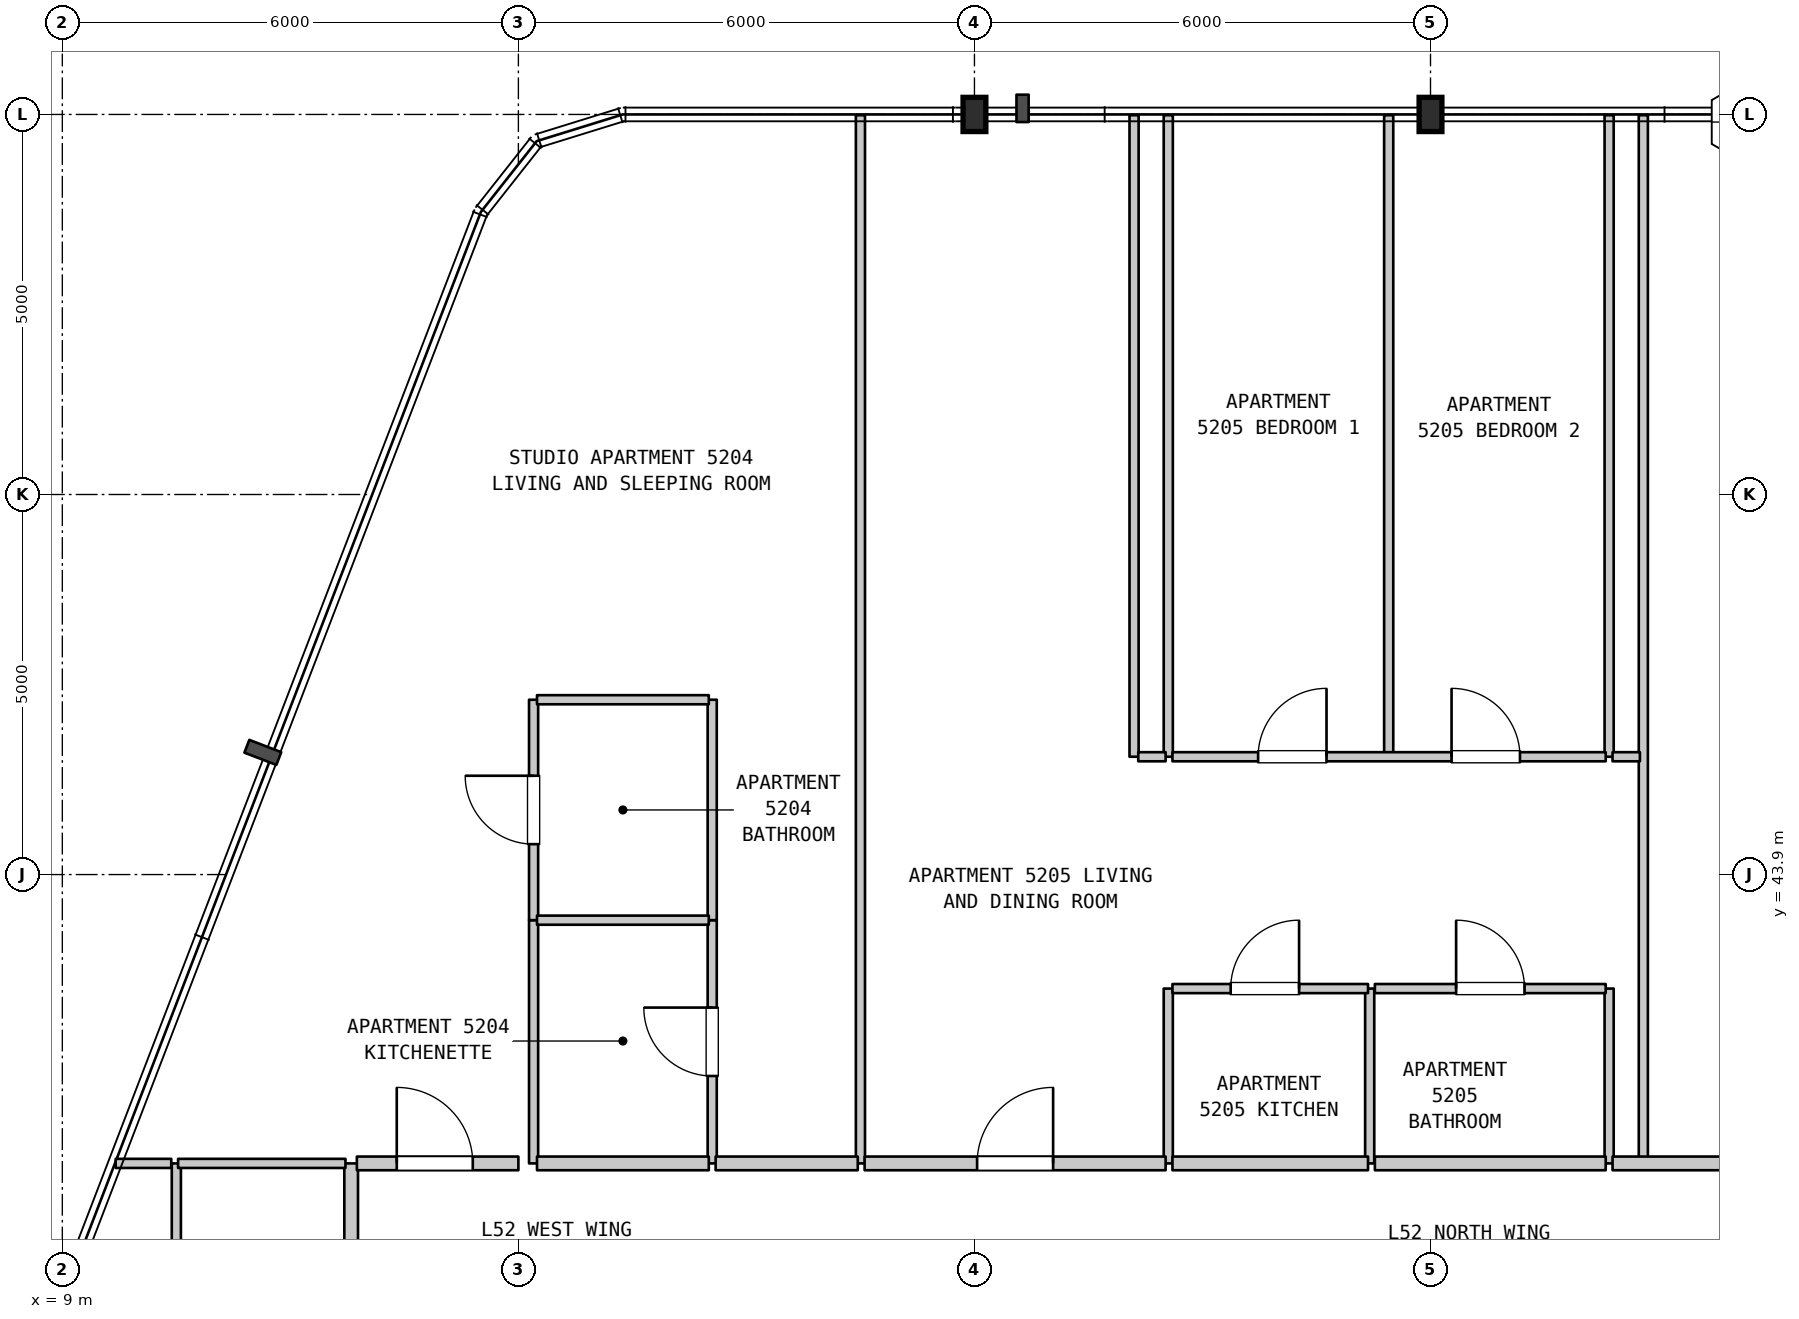
"""IFC4 building model, lengths in metres.
Left out: names, types, materials, properties, quantities, classifications, styles, units other than length and angle.
Written with IfcOpenShell. Run it as: python <this file> out.ifc"""

import sys

from ifc_helpers import new_model, si_unit, direction, frame, frame_2d, origin, origin_2d, place, context, subcontext, project, spatial, rectangle, i_section, extrude, element, fill, save


model = new_model("IFC4")
c1 = context("Model", 3, precision=1e-05, world=origin(), true_north=direction((0.0, 1.0)))
c2 = subcontext(c1, "Body", "Model", "MODEL_VIEW")
j1 = project(units=[si_unit("LENGTHUNIT", "METRE"), si_unit("PLANEANGLEUNIT", "RADIAN")], contexts=[c1])
p1 = place(None, origin())
s1 = spatial("IfcSite", under=j1, at=p1, CompositionType="ELEMENT")
p2 = place(p1, origin())
s2 = spatial("IfcBuilding", under=s1, at=p2, CompositionType="ELEMENT")
p3 = place(p2, frame((0.0, 0.0, 210.6)))
s3 = spatial("IfcBuildingStorey", under=s2, at=p3, CompositionType="ELEMENT", Elevation=210.6)
for number, where, z_axis, x_axis in (
    (1, (21.0, 53.9, 0.0), (0.0, 0.0, 1.0), (1.0, 0.0, 0.0)),
    (2, (27.0, 53.9, 0.0), (0.0, 0.0, 1.0), (1.0, 0.0, 0.0)),
):
    element("IfcColumn", number, at=place(p3, frame(where, z_axis=z_axis, x_axis=x_axis)), inside=s3, PredefinedType="COLUMN", context=c2, shape_type="SweptSolid", body=[
        extrude(i_section(OverallWidth=0.3, OverallDepth=0.45, WebThickness=0.014, FlangeThickness=0.026, FilletRadius=0.027, at=origin_2d()), origin(), (0.0, 0.0, 1.0), 3.7),
    ])
p4 = place(p3, frame((10.5, 31.45, 0.0), z_axis=(0.0, 0.0, 1.0), x_axis=(0.0, 1.0, 0.0)))
e3 = element("IfcWall", 3, at=p4, inside=s3, PredefinedType="PARTITIONING", context=c2, shape_type="SweptSolid", body=[
    extrude(rectangle(XDim=8.65, YDim=0.12, at=frame_2d((4.325, 0.0))), origin(), (0.0, 0.0, 1.0), 3.39),
])
p5 = place(p3, frame((12.8, 31.45, 0.0), z_axis=(0.0, 0.0, 1.0), x_axis=(0.0, 1.0, 0.0)))
e4 = element("IfcWall", 4, at=p5, inside=s3, PredefinedType="STANDARD", context=c2, shape_type="SweptSolid", body=[
    extrude(rectangle(XDim=8.65, YDim=0.18, at=frame_2d((4.325, 0.0))), origin(), (0.0, 0.0, 1.0), 3.39),
])
p6 = place(p3, frame((15.2, 40.1, 0.0), z_axis=(0.0, 0.0, 1.0), x_axis=(0.0, 1.0, 0.0)))
e5 = element("IfcWall", 5, at=p6, inside=s3, PredefinedType="PARTITIONING", context=c2, shape_type="SweptSolid", body=[
    extrude(rectangle(XDim=3.2, YDim=0.12, at=frame_2d((1.6, 0.0))), origin(), (0.0, 0.0, 1.0), 3.39),
])
p7 = place(p3, frame((15.2, 43.3, 0.0), z_axis=(0.0, 0.0, 1.0), x_axis=(0.0, 1.0, 0.0)))
e6 = element("IfcWall", 6, at=p7, inside=s3, PredefinedType="PARTITIONING", context=c2, shape_type="SweptSolid", body=[
    extrude(rectangle(XDim=2.9, YDim=0.12, at=frame_2d((1.45, 0.0))), origin(), (0.0, 0.0, 1.0), 3.39),
])
p8 = place(p7, frame((1.0, 0.0, 0.0)))
e7 = element("IfcOpeningElement", 7, at=p8, cuts=e6, PredefinedType="OPENING", context=c2, shape_type="SweptSolid", body=[
    extrude(rectangle(XDim=0.9, YDim=2.1, at=frame_2d((0.45, 1.05))), frame((0.0, 0.07, 0.0), z_axis=(0.0, -1.0, 0.0), x_axis=(1.0, 0.0, 0.0)), (0.0, 0.0, 1.0), 0.14),
])
p9 = place(p3, frame((17.55, 40.1, 0.0), z_axis=(0.0, 0.0, 1.0), x_axis=(0.0, 1.0, 0.0)))
e8 = element("IfcWall", 8, at=p9, inside=s3, PredefinedType="PARTITIONING", context=c2, shape_type="SweptSolid", body=[
    extrude(rectangle(XDim=3.2, YDim=0.12, at=frame_2d((1.6, 0.0))), origin(), (0.0, 0.0, 1.0), 3.39),
])
p10 = place(p9, frame((1.15, 0.0, 0.0)))
e9 = element("IfcOpeningElement", 9, at=p10, cuts=e8, PredefinedType="OPENING", context=c2, shape_type="SweptSolid", body=[
    extrude(rectangle(XDim=0.9, YDim=2.15, at=frame_2d((0.45, 1.075))), frame((0.0, 0.07, 0.0), z_axis=(0.0, -1.0, 0.0), x_axis=(1.0, 0.0, 0.0)), (0.0, 0.0, 1.0), 0.14),
])
p11 = place(p3, frame((17.55, 43.3, 0.0), z_axis=(0.0, 0.0, 1.0), x_axis=(0.0, 1.0, 0.0)))
e10 = element("IfcWall", 10, at=p11, inside=s3, PredefinedType="PARTITIONING", context=c2, shape_type="SweptSolid", body=[
    extrude(rectangle(XDim=2.9, YDim=0.12, at=frame_2d((1.45, 0.0))), origin(), (0.0, 0.0, 1.0), 3.39),
])
p12 = place(p3, frame((19.5, 40.1, 0.0), z_axis=(0.0, 0.0, 1.0), x_axis=(0.0, 1.0, 0.0)))
e11 = element("IfcWall", 11, at=p12, inside=s3, PredefinedType="PARTITIONING", context=c2, shape_type="SweptSolid", body=[
    extrude(rectangle(XDim=13.79, YDim=0.12, at=frame_2d((6.895, 0.0))), origin(), (0.0, 0.0, 1.0), 3.39),
])
p13 = place(p3, frame((23.1, 45.45, 0.0), z_axis=(0.0, 0.0, 1.0), x_axis=(0.0, 1.0, 0.0)))
e12 = element("IfcWall", 12, at=p13, inside=s3, PredefinedType="PARTITIONING", context=c2, shape_type="SweptSolid", body=[
    extrude(rectangle(XDim=8.44, YDim=0.12, at=frame_2d((4.22, 0.0))), origin(), (0.0, 0.0, 1.0), 3.39),
])
p14 = place(p3, frame((23.55, 40.1, 0.0), z_axis=(0.0, 0.0, 1.0), x_axis=(0.0, 1.0, 0.0)))
e13 = element("IfcWall", 13, at=p14, inside=s3, PredefinedType="PARTITIONING", context=c2, shape_type="SweptSolid", body=[
    extrude(rectangle(XDim=2.3, YDim=0.12, at=frame_2d((1.15, 0.0))), origin(), (0.0, 0.0, 1.0), 3.39),
])
p15 = place(p3, frame((23.55, 45.45, 0.0), z_axis=(0.0, 0.0, 1.0), x_axis=(0.0, 1.0, 0.0)))
e14 = element("IfcWall", 14, at=p15, inside=s3, PredefinedType="PARTITIONING", context=c2, shape_type="SweptSolid", body=[
    extrude(rectangle(XDim=8.44, YDim=0.12, at=frame_2d((4.22, 0.0))), origin(), (0.0, 0.0, 1.0), 3.39),
])
p16 = place(p3, frame((26.2, 40.1, 0.0), z_axis=(0.0, 0.0, 1.0), x_axis=(0.0, 1.0, 0.0)))
e15 = element("IfcWall", 15, at=p16, inside=s3, PredefinedType="PARTITIONING", context=c2, shape_type="SweptSolid", body=[
    extrude(rectangle(XDim=2.3, YDim=0.12, at=frame_2d((1.15, 0.0))), origin(), (0.0, 0.0, 1.0), 3.39),
])
p17 = place(p3, frame((26.45, 45.45, 0.0), z_axis=(0.0, 0.0, 1.0), x_axis=(0.0, 1.0, 0.0)))
e16 = element("IfcWall", 16, at=p17, inside=s3, PredefinedType="PARTITIONING", context=c2, shape_type="SweptSolid", body=[
    extrude(rectangle(XDim=8.44, YDim=0.12, at=frame_2d((4.22, 0.0))), origin(), (0.0, 0.0, 1.0), 3.39),
])
p18 = place(p3, frame((29.35, 40.1, 0.0), z_axis=(0.0, 0.0, 1.0), x_axis=(0.0, 1.0, 0.0)))
e17 = element("IfcWall", 17, at=p18, inside=s3, PredefinedType="PARTITIONING", context=c2, shape_type="SweptSolid", body=[
    extrude(rectangle(XDim=2.3, YDim=0.12, at=frame_2d((1.15, 0.0))), origin(), (0.0, 0.0, 1.0), 3.39),
])
p19 = place(p3, frame((29.35, 45.45, 0.0), z_axis=(0.0, 0.0, 1.0), x_axis=(0.0, 1.0, 0.0)))
e18 = element("IfcWall", 18, at=p19, inside=s3, PredefinedType="PARTITIONING", context=c2, shape_type="SweptSolid", body=[
    extrude(rectangle(XDim=8.44, YDim=0.12, at=frame_2d((4.22, 0.0))), origin(), (0.0, 0.0, 1.0), 3.39),
])
p20 = place(p3, frame((29.8, 40.1, 0.0), z_axis=(0.0, 0.0, 1.0), x_axis=(0.0, 1.0, 0.0)))
e19 = element("IfcWall", 19, at=p20, inside=s3, PredefinedType="PARTITIONING", context=c2, shape_type="SweptSolid", body=[
    extrude(rectangle(XDim=13.79, YDim=0.12, at=frame_2d((6.895, 0.0))), origin(), (0.0, 0.0, 1.0), 3.39),
])
p21 = place(p3, frame((9.702, 40.1, 0.0), z_axis=(0.0, 0.0, 1.0), x_axis=(1.0, 0.0, 0.0)))
e20 = element("IfcWall", 20, at=p21, inside=s3, PredefinedType="PARTITIONING", context=c2, shape_type="SweptSolid", body=[
    extrude(rectangle(XDim=0.731, YDim=0.12, at=frame_2d((0.366, 0.0))), origin(), (0.0, 0.0, 1.0), 3.39),
])
p22 = place(p3, frame((10.523, 40.1, 0.0), z_axis=(0.0, 0.0, 1.0), x_axis=(1.0, 0.0, 0.0)))
e21 = element("IfcWall", 21, at=p22, inside=s3, PredefinedType="PARTITIONING", context=c2, shape_type="SweptSolid", body=[
    extrude(rectangle(XDim=2.202, YDim=0.12, at=frame_2d((1.101, 0.0))), origin(), (0.0, 0.0, 1.0), 3.39),
])
p23 = place(p3, frame((12.875, 40.1, 0.0), z_axis=(0.0, 0.0, 1.0), x_axis=(1.0, 0.0, 0.0)))
e22 = element("IfcWall", 22, at=p23, inside=s3, PredefinedType="STANDARD", context=c2, shape_type="SweptSolid", body=[
    extrude(rectangle(XDim=2.125, YDim=0.18, at=frame_2d((1.062, 0.0))), origin(), (0.0, 0.0, 1.0), 3.39),
])
p24 = place(p23, frame((0.525, 0.0, 0.0)))
e23 = element("IfcOpeningElement", 23, at=p24, cuts=e22, PredefinedType="OPENING", context=c2, shape_type="SweptSolid", body=[
    extrude(rectangle(XDim=1.0, YDim=2.15, at=frame_2d((0.5, 1.075))), frame((0.0, 0.1, 0.0), z_axis=(0.0, -1.0, 0.0), x_axis=(1.0, 0.0, 0.0)), (0.0, 0.0, 1.0), 0.2),
])
p25 = place(p3, frame((15.245, 40.1, 0.0), z_axis=(0.0, 0.0, 1.0), x_axis=(1.0, 0.0, 0.0)))
e24 = element("IfcWall", 24, at=p25, inside=s3, PredefinedType="STANDARD", context=c2, shape_type="SweptSolid", body=[
    extrude(rectangle(XDim=2.26, YDim=0.18, at=frame_2d((1.13, 0.0))), origin(), (0.0, 0.0, 1.0), 3.39),
])
p26 = place(p3, frame((17.595, 40.1, 0.0), z_axis=(0.0, 0.0, 1.0), x_axis=(1.0, 0.0, 0.0)))
e25 = element("IfcWall", 25, at=p26, inside=s3, PredefinedType="STANDARD", context=c2, shape_type="SweptSolid", body=[
    extrude(rectangle(XDim=1.87, YDim=0.18, at=frame_2d((0.935, 0.0))), origin(), (0.0, 0.0, 1.0), 3.39),
])
p27 = place(p3, frame((19.555, 40.1, 0.0), z_axis=(0.0, 0.0, 1.0), x_axis=(1.0, 0.0, 0.0)))
e26 = element("IfcWall", 26, at=p27, inside=s3, PredefinedType="STANDARD", context=c2, shape_type="SweptSolid", body=[
    extrude(rectangle(XDim=3.96, YDim=0.18, at=frame_2d((1.98, 0.0))), origin(), (0.0, 0.0, 1.0), 3.39),
])
p28 = place(p27, frame((1.48, 0.0, 0.0)))
e27 = element("IfcOpeningElement", 27, at=p28, cuts=e26, PredefinedType="OPENING", context=c2, shape_type="SweptSolid", body=[
    extrude(rectangle(XDim=1.0, YDim=2.15, at=frame_2d((0.5, 1.075))), frame((0.0, 0.1, 0.0), z_axis=(0.0, -1.0, 0.0), x_axis=(1.0, 0.0, 0.0)), (0.0, 0.0, 1.0), 0.2),
])
p29 = place(p3, frame((23.605, 40.1, 0.0), z_axis=(0.0, 0.0, 1.0), x_axis=(1.0, 0.0, 0.0)))
e28 = element("IfcWall", 28, at=p29, inside=s3, PredefinedType="STANDARD", context=c2, shape_type="SweptSolid", body=[
    extrude(rectangle(XDim=2.573, YDim=0.18, at=frame_2d((1.287, 0.0))), origin(), (0.0, 0.0, 1.0), 3.39),
])
p30 = place(p3, frame((26.268, 40.1, 0.0), z_axis=(0.0, 0.0, 1.0), x_axis=(1.0, 0.0, 0.0)))
e29 = element("IfcWall", 29, at=p30, inside=s3, PredefinedType="STANDARD", context=c2, shape_type="SweptSolid", body=[
    extrude(rectangle(XDim=3.037, YDim=0.18, at=frame_2d((1.519, 0.0))), origin(), (0.0, 0.0, 1.0), 3.39),
])
p31 = place(p3, frame((29.395, 40.1, 0.0), z_axis=(0.0, 0.0, 1.0), x_axis=(1.0, 0.0, 0.0)))
e30 = element("IfcWall", 30, at=p31, inside=s3, PredefinedType="STANDARD", context=c2, shape_type="SweptSolid", body=[
    extrude(rectangle(XDim=5.09, YDim=0.18, at=frame_2d((2.545, 0.0))), origin(), (0.0, 0.0, 1.0), 3.39),
])
p32 = place(p31, frame((2.174, 0.0, 0.0)))
e31 = element("IfcOpeningElement", 31, at=p32, cuts=e30, PredefinedType="OPENING", context=c2, shape_type="SweptSolid", body=[
    extrude(rectangle(XDim=1.0, YDim=2.15, at=frame_2d((0.5, 1.075))), frame((0.0, 0.1, 0.0), z_axis=(0.0, -1.0, 0.0), x_axis=(1.0, 0.0, 0.0)), (0.0, 0.0, 1.0), 0.2),
])
p33 = place(p3, frame((23.605, 42.4, 0.0), z_axis=(0.0, 0.0, 1.0), x_axis=(1.0, 0.0, 0.0)))
e32 = element("IfcWall", 32, at=p33, inside=s3, PredefinedType="PARTITIONING", context=c2, shape_type="SweptSolid", body=[
    extrude(rectangle(XDim=2.573, YDim=0.12, at=frame_2d((1.287, 0.0))), origin(), (0.0, 0.0, 1.0), 3.39),
])
p34 = place(p33, frame((0.766, 0.0, 0.0)))
e33 = element("IfcOpeningElement", 33, at=p34, cuts=e32, PredefinedType="OPENING", context=c2, shape_type="SweptSolid", body=[
    extrude(rectangle(XDim=0.9, YDim=2.15, at=frame_2d((0.45, 1.075))), frame((0.0, 0.07, 0.0), z_axis=(0.0, -1.0, 0.0), x_axis=(1.0, 0.0, 0.0)), (0.0, 0.0, 1.0), 0.14),
])
p35 = place(p3, frame((26.268, 42.4, 0.0), z_axis=(0.0, 0.0, 1.0), x_axis=(1.0, 0.0, 0.0)))
e34 = element("IfcWall", 34, at=p35, inside=s3, PredefinedType="PARTITIONING", context=c2, shape_type="SweptSolid", body=[
    extrude(rectangle(XDim=3.037, YDim=0.12, at=frame_2d((1.519, 0.0))), origin(), (0.0, 0.0, 1.0), 3.39),
])
p36 = place(p35, frame((1.069, 0.0, 0.0)))
e35 = element("IfcOpeningElement", 35, at=p36, cuts=e34, PredefinedType="OPENING", context=c2, shape_type="SweptSolid", body=[
    extrude(rectangle(XDim=0.9, YDim=2.1, at=frame_2d((0.45, 1.05))), frame((0.0, 0.07, 0.0), z_axis=(0.0, -1.0, 0.0), x_axis=(1.0, 0.0, 0.0)), (0.0, 0.0, 1.0), 0.14),
])
p37 = place(p3, frame((15.245, 43.3, 0.0), z_axis=(0.0, 0.0, 1.0), x_axis=(1.0, 0.0, 0.0)))
e36 = element("IfcWall", 36, at=p37, inside=s3, PredefinedType="PARTITIONING", context=c2, shape_type="SweptSolid", body=[
    extrude(rectangle(XDim=2.26, YDim=0.12, at=frame_2d((1.13, 0.0))), origin(), (0.0, 0.0, 1.0), 3.39),
])
p38 = place(p3, frame((23.155, 45.45, 0.0), z_axis=(0.0, 0.0, 1.0), x_axis=(1.0, 0.0, 0.0)))
e37 = element("IfcWall", 37, at=p38, inside=s3, PredefinedType="PARTITIONING", context=c2, shape_type="SweptSolid", body=[
    extrude(rectangle(XDim=0.36, YDim=0.12, at=frame_2d((0.18, 0.0))), origin(), (0.0, 0.0, 1.0), 3.39),
])
p39 = place(p3, frame((23.605, 45.45, 0.0), z_axis=(0.0, 0.0, 1.0), x_axis=(1.0, 0.0, 0.0)))
e38 = element("IfcWall", 38, at=p39, inside=s3, PredefinedType="PARTITIONING", context=c2, shape_type="SweptSolid", body=[
    extrude(rectangle(XDim=5.7, YDim=0.12, at=frame_2d((2.85, 0.0))), origin(), (0.0, 0.0, 1.0), 3.39),
])
p40 = place(p39, frame((1.127, 0.0, 0.0)))
e39 = element("IfcOpeningElement", 39, at=p40, cuts=e38, PredefinedType="OPENING", context=c2, shape_type="SweptSolid", body=[
    extrude(rectangle(XDim=0.9, YDim=2.15, at=frame_2d((0.45, 1.075))), frame((0.0, 0.07, 0.0), z_axis=(0.0, -1.0, 0.0), x_axis=(1.0, 0.0, 0.0)), (0.0, 0.0, 1.0), 0.14),
])
p41 = place(p39, frame((3.672, 0.0, 0.0)))
e40 = element("IfcOpeningElement", 40, at=p41, cuts=e38, PredefinedType="OPENING", context=c2, shape_type="SweptSolid", body=[
    extrude(rectangle(XDim=0.9, YDim=2.15, at=frame_2d((0.45, 1.075))), frame((0.0, 0.07, 0.0), z_axis=(0.0, -1.0, 0.0), x_axis=(1.0, 0.0, 0.0)), (0.0, 0.0, 1.0), 0.14),
])
p42 = place(p3, frame((29.395, 45.45, 0.0), z_axis=(0.0, 0.0, 1.0), x_axis=(1.0, 0.0, 0.0)))
e41 = element("IfcWall", 41, at=p42, inside=s3, PredefinedType="PARTITIONING", context=c2, shape_type="SweptSolid", body=[
    extrude(rectangle(XDim=0.36, YDim=0.12, at=frame_2d((0.18, 0.0))), origin(), (0.0, 0.0, 1.0), 3.39),
])
p43 = place(p3, frame((15.245, 46.2, 0.0), z_axis=(0.0, 0.0, 1.0), x_axis=(1.0, 0.0, 0.0)))
e42 = element("IfcWall", 42, at=p43, inside=s3, PredefinedType="PARTITIONING", context=c2, shape_type="SweptSolid", body=[
    extrude(rectangle(XDim=2.26, YDim=0.12, at=frame_2d((1.13, 0.0))), origin(), (0.0, 0.0, 1.0), 3.39),
])
p44 = place(p8, origin())
e43 = element("IfcDoor", 43, at=p44, inside=s3, OperationType="SINGLE_SWING_RIGHT", PredefinedType="DOOR", context=c2, shape_type="SweptSolid", body=[
    extrude(rectangle(XDim=0.9, YDim=2.1, at=frame_2d((0.45, 1.05))), frame((0.0, 0.025, 0.0), z_axis=(0.0, -1.0, 0.0), x_axis=(1.0, 0.0, 0.0)), (0.0, 0.0, 1.0), 0.05),
])
fill(e7, e43)
p45 = place(p10, origin())
e44 = element("IfcDoor", 44, at=p45, inside=s3, OperationType="SINGLE_SWING_RIGHT", PredefinedType="DOOR", context=c2, shape_type="SweptSolid", body=[
    extrude(rectangle(XDim=0.9, YDim=2.15, at=frame_2d((0.45, 1.075))), frame((0.0, 0.025, 0.0), z_axis=(0.0, -1.0, 0.0), x_axis=(1.0, 0.0, 0.0)), (0.0, 0.0, 1.0), 0.05),
])
fill(e9, e44)
p46 = place(p24, origin())
e45 = element("IfcDoor", 45, at=p46, inside=s3, OperationType="SINGLE_SWING_LEFT", PredefinedType="DOOR", context=c2, shape_type="SweptSolid", body=[
    extrude(rectangle(XDim=1.0, YDim=2.15, at=frame_2d((0.5, 1.075))), frame((0.0, 0.025, 0.0), z_axis=(0.0, -1.0, 0.0), x_axis=(1.0, 0.0, 0.0)), (0.0, 0.0, 1.0), 0.05),
])
fill(e23, e45)
p47 = place(p28, origin())
e46 = element("IfcDoor", 46, at=p47, inside=s3, OperationType="SINGLE_SWING_RIGHT", PredefinedType="DOOR", context=c2, shape_type="SweptSolid", body=[
    extrude(rectangle(XDim=1.0, YDim=2.15, at=frame_2d((0.5, 1.075))), frame((0.0, 0.025, 0.0), z_axis=(0.0, -1.0, 0.0), x_axis=(1.0, 0.0, 0.0)), (0.0, 0.0, 1.0), 0.05),
])
fill(e27, e46)
p48 = place(p34, origin())
e47 = element("IfcDoor", 47, at=p48, inside=s3, OperationType="SINGLE_SWING_RIGHT", PredefinedType="DOOR", context=c2, shape_type="SweptSolid", body=[
    extrude(rectangle(XDim=0.9, YDim=2.15, at=frame_2d((0.45, 1.075))), frame((0.0, 0.025, 0.0), z_axis=(0.0, -1.0, 0.0), x_axis=(1.0, 0.0, 0.0)), (0.0, 0.0, 1.0), 0.05),
])
fill(e33, e47)
p49 = place(p36, origin())
e48 = element("IfcDoor", 48, at=p49, inside=s3, OperationType="SINGLE_SWING_LEFT", PredefinedType="DOOR", context=c2, shape_type="SweptSolid", body=[
    extrude(rectangle(XDim=0.9, YDim=2.1, at=frame_2d((0.45, 1.05))), frame((0.0, 0.025, 0.0), z_axis=(0.0, -1.0, 0.0), x_axis=(1.0, 0.0, 0.0)), (0.0, 0.0, 1.0), 0.05),
])
fill(e35, e48)
p50 = place(p40, origin())
e49 = element("IfcDoor", 49, at=p50, inside=s3, OperationType="SINGLE_SWING_RIGHT", PredefinedType="DOOR", context=c2, shape_type="SweptSolid", body=[
    extrude(rectangle(XDim=0.9, YDim=2.15, at=frame_2d((0.45, 1.075))), frame((0.0, 0.025, 0.0), z_axis=(0.0, -1.0, 0.0), x_axis=(1.0, 0.0, 0.0)), (0.0, 0.0, 1.0), 0.05),
])
fill(e39, e49)
p51 = place(p41, origin())
e50 = element("IfcDoor", 50, at=p51, inside=s3, OperationType="SINGLE_SWING_LEFT", PredefinedType="DOOR", context=c2, shape_type="SweptSolid", body=[
    extrude(rectangle(XDim=0.9, YDim=2.15, at=frame_2d((0.45, 1.075))), frame((0.0, 0.025, 0.0), z_axis=(0.0, -1.0, 0.0), x_axis=(1.0, 0.0, 0.0)), (0.0, 0.0, 1.0), 0.05),
])
fill(e40, e50)
save(model, sys.argv[1])
